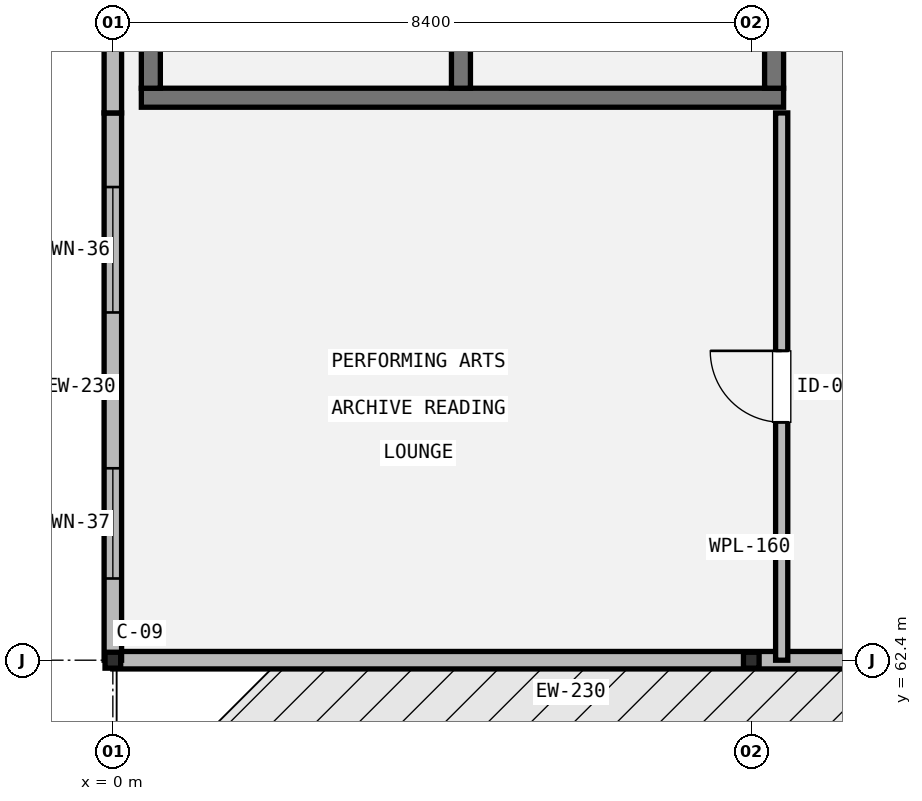
"""IFC4 building model, lengths in metres.
Left out: names, types, materials, properties, quantities, classifications, styles, units other than length and angle.
Written with IfcOpenShell. Run it as: python <this file> out.ifc"""

import sys

from ifc_helpers import new_model, si_unit, direction, frame, frame_2d, origin, origin_2d, place, context, subcontext, project, spatial, rectangle, i_section, extrude, element, fill, save


model = new_model("IFC4")
c1 = context("Model", 3, precision=1e-05, world=origin(), true_north=direction((0.0, 1.0)))
c2 = subcontext(c1, "Body", "Model", "MODEL_VIEW")
j1 = project(units=[si_unit("LENGTHUNIT", "METRE"), si_unit("PLANEANGLEUNIT", "RADIAN")], contexts=[c1])
p1 = place(None, origin())
s1 = spatial("IfcSite", under=j1, at=p1, CompositionType="ELEMENT")
p2 = place(p1, origin())
s2 = spatial("IfcBuilding", under=s1, at=p2, CompositionType="ELEMENT")
p3 = place(p2, frame((0.0, 0.0, 19.2)))
s3 = spatial("IfcBuildingStorey", under=s2, at=p3, CompositionType="ELEMENT", Elevation=19.2)
for number, where, z_axis, x_axis in (
    (1, (0.0, 62.4, 0.0), (0.0, 0.0, 1.0), (1.0, 0.0, 0.0)),
    (2, (8.4, 62.4, 0.0), (0.0, 0.0, 1.0), (1.0, 0.0, 0.0)),
):
    element("IfcColumn", number, at=place(p3, frame(where, z_axis=z_axis, x_axis=x_axis)), inside=s3, PredefinedType="COLUMN", context=c2, shape_type="SweptSolid", body=[
        extrude(i_section(OverallWidth=0.206, OverallDepth=0.21, WebThickness=0.01, FlangeThickness=0.014, FilletRadius=0.01, at=origin_2d()), origin(), (0.0, 0.0, 1.0), 4.2),
    ])
p4 = place(p3, frame((25.2, 62.4, 0.0), z_axis=(0.0, 0.0, 1.0), x_axis=(-1.0, 0.0, 0.0)))
e3 = element("IfcWall", 3, at=p4, inside=s3, PredefinedType="STANDARD", context=c2, shape_type="SweptSolid", body=[
    extrude(rectangle(XDim=25.2, YDim=0.23, at=frame_2d((12.6, 0.0))), origin(), (0.0, 0.0, 1.0), 3.952),
])
p5 = place(p4, frame((11.5, 0.0, 0.0)))
e4 = element("IfcOpeningElement", 4, at=p5, cuts=e3, PredefinedType="OPENING", context=c2, shape_type="SweptSolid", body=[
    extrude(rectangle(XDim=1.5, YDim=2.3, at=frame_2d((0.75, 1.15))), frame((0.0, 0.125, 0.0), z_axis=(0.0, -1.0, 0.0), x_axis=(1.0, 0.0, 0.0)), (0.0, 0.0, 1.0), 0.25),
])
p6 = place(p3, frame((0.0, 62.4, 0.0), z_axis=(0.0, 0.0, 1.0), x_axis=(0.0, 1.0, 0.0)))
e5 = element("IfcWall", 5, at=p6, inside=s3, PredefinedType="STANDARD", context=c2, shape_type="SweptSolid", body=[
    extrude(rectangle(XDim=7.2, YDim=0.23, at=frame_2d((3.6, 0.0))), origin(), (0.0, 0.0, 1.0), 3.952),
])
p7 = place(p6, frame((1.075, 0.0, 0.9)))
e6 = element("IfcOpeningElement", 6, at=p7, cuts=e5, PredefinedType="OPENING", context=c2, shape_type="SweptSolid", body=[
    extrude(rectangle(XDim=1.45, YDim=1.65, at=frame_2d((0.725, 0.825))), frame((0.0, 0.125, 0.0), z_axis=(0.0, -1.0, 0.0), x_axis=(1.0, 0.0, 0.0)), (0.0, 0.0, 1.0), 0.25),
])
p8 = place(p6, frame((4.575, 0.0, 0.9)))
e7 = element("IfcOpeningElement", 7, at=p8, cuts=e5, PredefinedType="OPENING", context=c2, shape_type="SweptSolid", body=[
    extrude(rectangle(XDim=1.65, YDim=1.65, at=frame_2d((0.825, 0.825))), frame((0.0, 0.125, 0.0), z_axis=(0.0, -1.0, 0.0), x_axis=(1.0, 0.0, 0.0)), (0.0, 0.0, 1.0), 0.25),
])
p9 = place(p3, frame((0.0, 69.6, 0.0), z_axis=(0.0, 0.0, 1.0), x_axis=(0.0, 1.0, 0.0)))
e8 = element("IfcWall", 8, at=p9, inside=s3, PredefinedType="STANDARD", context=c2, shape_type="SweptSolid", body=[
    extrude(rectangle(XDim=11.0, YDim=0.23, at=frame_2d((5.5, 0.0))), origin(), (0.0, 0.0, 1.0), 3.952),
])
p10 = place(p3, frame((8.825, 69.8, 0.0), z_axis=(0.0, 0.0, 1.0), x_axis=(-1.0, 0.0, 0.0)))
e9 = element("IfcWall", 9, at=p10, inside=s3, PredefinedType="SHEAR", context=c2, shape_type="SweptSolid", body=[
    extrude(rectangle(XDim=8.45, YDim=0.25, at=frame_2d((4.225, 0.0))), origin(), (0.0, 0.0, 1.0), 4.0),
])
for number, where, z_axis, x_axis in (
    (10, (0.5, 69.925, 0.0), (0.0, 0.0, 1.0), (0.0, 1.0, 0.0)),
    (11, (8.7, 79.935, 0.0), (0.0, 0.0, 1.0), (0.0, -1.0, 0.0)),
):
    element("IfcWall", number, at=place(p3, frame(where, z_axis=z_axis, x_axis=x_axis)), inside=s3, PredefinedType="SHEAR", context=c2, shape_type="SweptSolid", body=[
        extrude(rectangle(XDim=10.01, YDim=0.25, at=frame_2d((5.005, 0.0))), origin(), (0.0, 0.0, 1.0), 4.0),
    ])
p11 = place(p3, frame((4.58, 79.935, 0.0), z_axis=(0.0, 0.0, 1.0), x_axis=(0.0, -1.0, 0.0)))
e12 = element("IfcWall", 12, at=p11, inside=s3, PredefinedType="SHEAR", context=c2, shape_type="SweptSolid", body=[
    extrude(rectangle(XDim=10.01, YDim=0.25, at=frame_2d((5.005, 0.0))), origin(), (0.0, 0.0, 1.0), 4.0),
])
p12 = place(p11, frame((8.36, 0.0, 0.0)))
e13 = element("IfcOpeningElement", 13, at=p12, cuts=e12, PredefinedType="OPENING", context=c2, shape_type="SweptSolid", body=[
    extrude(rectangle(XDim=1.1, YDim=2.15, at=frame_2d((0.55, 1.075))), frame((0.0, 0.135, 0.0), z_axis=(0.0, -1.0, 0.0), x_axis=(1.0, 0.0, 0.0)), (0.0, 0.0, 1.0), 0.27),
])
p13 = place(p3, frame((8.8, 62.4, 0.0), z_axis=(0.0, 0.0, 1.0), x_axis=(0.0, 1.0, 0.0)))
e14 = element("IfcWall", 14, at=p13, inside=s3, PredefinedType="PLUMBINGWALL", context=c2, shape_type="SweptSolid", body=[
    extrude(rectangle(XDim=7.2, YDim=0.16, at=frame_2d((3.6, 0.0))), origin(), (0.0, 0.0, 1.0), 3.952),
])
p14 = place(p13, frame((3.13, 0.0, 0.0)))
e15 = element("IfcOpeningElement", 15, at=p14, cuts=e14, PredefinedType="OPENING", context=c2, shape_type="SweptSolid", body=[
    extrude(rectangle(XDim=0.94, YDim=2.1, at=frame_2d((0.47, 1.05))), frame((0.0, 0.09, 0.0), z_axis=(0.0, -1.0, 0.0), x_axis=(1.0, 0.0, 0.0)), (0.0, 0.0, 1.0), 0.18),
])
p15 = place(p7, origin())
e16 = element("IfcWindow", 16, at=p15, inside=s3, PartitioningType="SINGLE_PANEL", PredefinedType="WINDOW", context=c2, shape_type="SweptSolid", body=[
    extrude(rectangle(XDim=1.45, YDim=1.65, at=frame_2d((0.725, 0.825))), frame((0.0, 0.03, 0.0), z_axis=(0.0, -1.0, 0.0), x_axis=(1.0, 0.0, 0.0)), (0.0, 0.0, 1.0), 0.06),
])
fill(e6, e16)
p16 = place(p8, origin())
e17 = element("IfcWindow", 17, at=p16, inside=s3, PartitioningType="SINGLE_PANEL", PredefinedType="WINDOW", context=c2, shape_type="SweptSolid", body=[
    extrude(rectangle(XDim=1.65, YDim=1.65, at=frame_2d((0.825, 0.825))), frame((0.0, 0.03, 0.0), z_axis=(0.0, -1.0, 0.0), x_axis=(1.0, 0.0, 0.0)), (0.0, 0.0, 1.0), 0.06),
])
fill(e7, e17)
p17 = place(p14, origin())
e18 = element("IfcDoor", 18, at=p17, inside=s3, OperationType="SINGLE_SWING_RIGHT", PredefinedType="DOOR", context=c2, shape_type="SweptSolid", body=[
    extrude(rectangle(XDim=0.94, YDim=2.1, at=frame_2d((0.47, 1.05))), frame((0.0, 0.025, 0.0), z_axis=(0.0, -1.0, 0.0), x_axis=(1.0, 0.0, 0.0)), (0.0, 0.0, 1.0), 0.05),
])
fill(e15, e18)
save(model, sys.argv[1])
